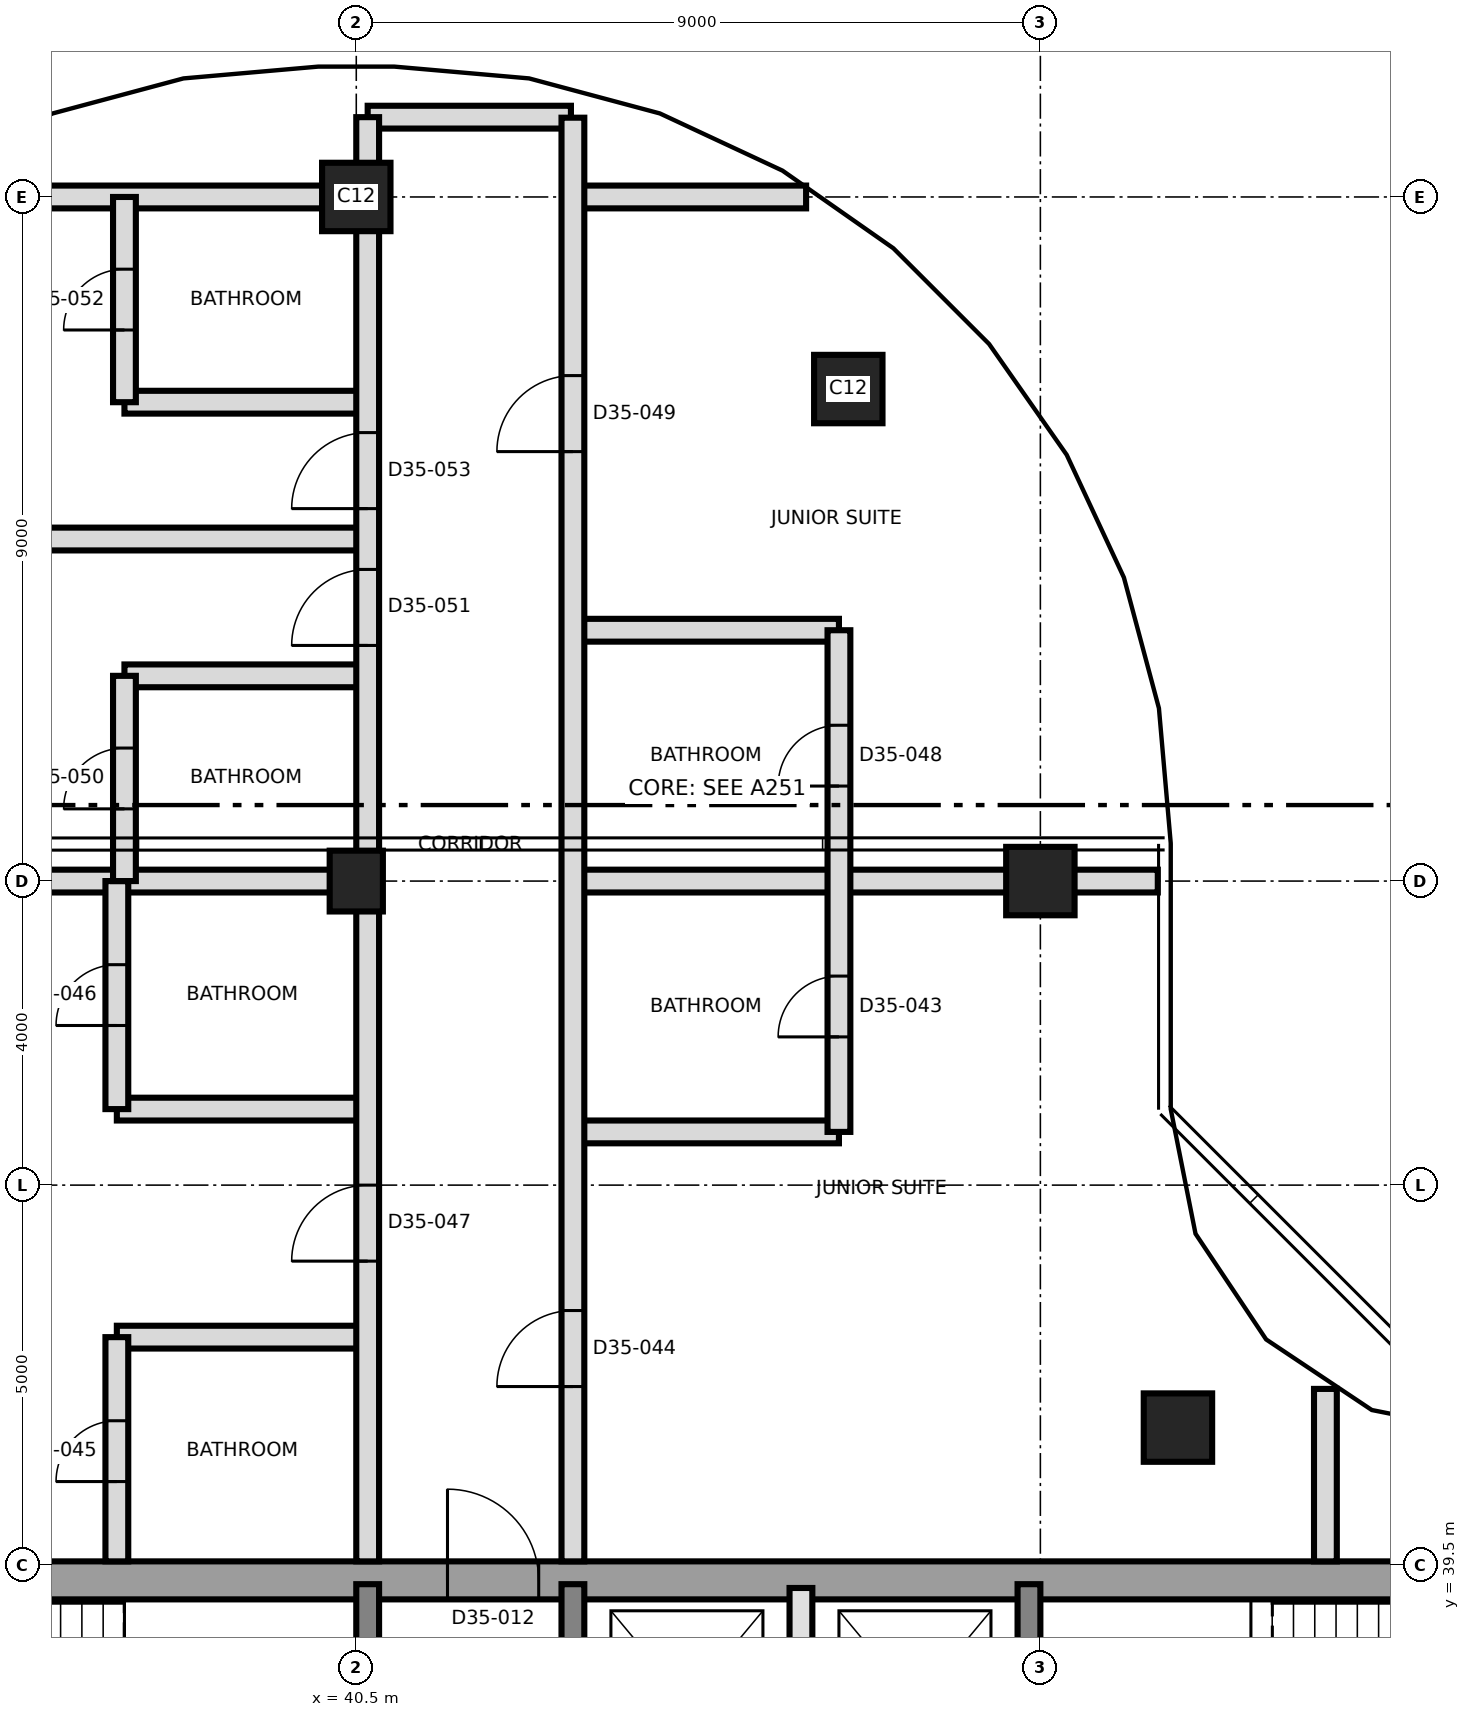
"""IFC4 building model, lengths in metres.
Left out: names, types, materials, properties, quantities, classifications, styles, units other than length and angle.
Written with IfcOpenShell. Run it as: python <this file> out.ifc"""

import sys

from ifc_helpers import new_model, si_unit, direction, frame, frame_2d, origin, origin_2d, place, context, subcontext, project, spatial, rectangle, extrude, element, fill, save


model = new_model("IFC4")
c1 = context("Model", 3, precision=1e-05, world=origin(), true_north=direction((0.0, 1.0)))
c2 = subcontext(c1, "Body", "Model", "MODEL_VIEW")
j1 = project(units=[si_unit("LENGTHUNIT", "METRE"), si_unit("PLANEANGLEUNIT", "RADIAN")], contexts=[c1])
p1 = place(None, origin())
s1 = spatial("IfcSite", under=j1, at=p1, CompositionType="ELEMENT")
p2 = place(p1, origin())
s2 = spatial("IfcBuilding", under=s1, at=p2, CompositionType="ELEMENT")
p3 = place(p2, frame((0.0, 0.0, 195.8)))
s3 = spatial("IfcBuildingStorey", under=s2, at=p3, CompositionType="ELEMENT", Elevation=195.8)
p4 = place(p3, frame((31.25, 39.3, 0.0), z_axis=(0.0, 0.0, 1.0), x_axis=(1.0, 0.0, 0.0)))
e1 = element("IfcWall", 1, at=p4, inside=s3, PredefinedType="SHEAR", context=c2, shape_type="SweptSolid", body=[
    extrude(rectangle(XDim=27.0, YDim=0.5, at=frame_2d((13.5, 0.0))), origin(), (0.0, 0.0, 1.0), 3.7),
])
p5 = place(p4, frame((10.45, 0.0, 0.0)))
e2 = element("IfcOpeningElement", 2, at=p5, cuts=e1, PredefinedType="OPENING", context=c2, shape_type="SweptSolid", body=[
    extrude(rectangle(XDim=1.2, YDim=2.1, at=frame_2d((0.6, 1.05))), frame((0.0, 0.26, 0.0), z_axis=(0.0, -1.0, 0.0), x_axis=(1.0, 0.0, 0.0)), (0.0, 0.0, 1.0), 0.52),
])
for number, where, z_axis, x_axis in (
    (3, (40.65, 33.5, 0.0), (0.0, 0.0, 1.0), (0.0, 1.0, 0.0)),
    (4, (43.35, 33.5, 0.0), (0.0, 0.0, 1.0), (0.0, 1.0, 0.0)),
    (5, (49.35, 33.5, 0.0), (0.0, 0.0, 1.0), (0.0, 1.0, 0.0)),
):
    element("IfcWall", number, at=place(p3, frame(where, z_axis=z_axis, x_axis=x_axis)), inside=s3, PredefinedType="SHEAR", context=c2, shape_type="SweptSolid", body=[
        extrude(rectangle(XDim=5.75, YDim=0.3, at=frame_2d((2.875, 0.0))), origin(), (0.0, 0.0, 1.0), 3.7),
    ])
p6 = place(p3, frame((51.31, 41.31, 0.0), z_axis=(0.0, 0.0, 1.0), x_axis=(1.0, 0.0, 0.0)))
e6 = element("IfcColumn", 6, at=p6, inside=s3, PredefinedType="COLUMN", context=c2, shape_type="SweptSolid", body=[
    extrude(rectangle(XDim=0.9, YDim=0.9, at=origin_2d()), origin(), (0.0, 0.0, 1.0), 3.7),
])
p7 = place(p3, frame((40.5, 48.5, 0.0), z_axis=(0.0, 0.0, 1.0), x_axis=(0.0, 1.0, 0.0)))
e7 = element("IfcColumn", 7, at=p7, inside=s3, PredefinedType="COLUMN", context=c2, shape_type="SweptSolid", body=[
    extrude(rectangle(XDim=0.8, YDim=0.7, at=origin_2d()), origin(), (0.0, 0.0, 1.0), 3.7),
])
for number, where, z_axis, x_axis in (
    (8, (49.5, 48.5, 0.0), (0.0, 0.0, 1.0), (1.0, 0.0, 0.0)),
    (9, (46.973, 54.973, 0.0), (0.0, 0.0, 1.0), (1.0, 0.0, 0.0)),
    (10, (40.5, 57.5, 0.0), (0.0, 0.0, 1.0), (1.0, 0.0, 0.0)),
):
    element("IfcColumn", number, at=place(p3, frame(where, z_axis=z_axis, x_axis=x_axis)), inside=s3, PredefinedType="COLUMN", context=c2, shape_type="SweptSolid", body=[
        extrude(rectangle(XDim=0.9, YDim=0.9, at=origin_2d()), origin(), (0.0, 0.0, 1.0), 3.7),
    ])
p8 = place(p3, frame((46.35, 36.2, 0.0), z_axis=(0.0, 0.0, 1.0), x_axis=(0.0, 1.0, 0.0)))
e11 = element("IfcWall", 11, at=p8, inside=s3, PredefinedType="SOLIDWALL", context=c2, shape_type="SweptSolid", body=[
    extrude(rectangle(XDim=3.0, YDim=0.3, at=frame_2d((1.5, 0.0))), origin(), (0.0, 0.0, 1.0), 3.4),
])
p9 = place(p3, frame((37.35, 42.5, 0.0), z_axis=(0.0, 0.0, 1.0), x_axis=(1.0, 0.0, 0.0)))
e12 = element("IfcWall", 12, at=p9, inside=s3, PredefinedType="PARTITIONING", context=c2, shape_type="SweptSolid", body=[
    extrude(rectangle(XDim=3.3, YDim=0.3, at=frame_2d((1.65, 0.0))), origin(), (0.0, 0.0, 1.0), 3.4),
])
p10 = place(p3, frame((43.35, 45.2, 0.0), z_axis=(0.0, 0.0, 1.0), x_axis=(1.0, 0.0, 0.0)))
e13 = element("IfcWall", 13, at=p10, inside=s3, PredefinedType="PARTITIONING", context=c2, shape_type="SweptSolid", body=[
    extrude(rectangle(XDim=3.5, YDim=0.3, at=frame_2d((1.75, 0.0))), origin(), (0.0, 0.0, 1.0), 3.4),
])
p11 = place(p3, frame((37.35, 45.5, 0.0), z_axis=(0.0, 0.0, 1.0), x_axis=(1.0, 0.0, 0.0)))
e14 = element("IfcWall", 14, at=p11, inside=s3, PredefinedType="PARTITIONING", context=c2, shape_type="SweptSolid", body=[
    extrude(rectangle(XDim=3.3, YDim=0.3, at=frame_2d((1.65, 0.0))), origin(), (0.0, 0.0, 1.0), 3.4),
])
p12 = place(p3, frame((30.135, 48.5, 0.0), z_axis=(0.0, 0.0, 1.0), x_axis=(1.0, 0.0, 0.0)))
e15 = element("IfcWall", 15, at=p12, inside=s3, PredefinedType="PARTITIONING", context=c2, shape_type="SweptSolid", body=[
    extrude(rectangle(XDim=10.515, YDim=0.3, at=frame_2d((5.257, 0.0))), origin(), (0.0, 0.0, 1.0), 3.4),
])
p13 = place(p3, frame((43.35, 48.5, 0.0), z_axis=(0.0, 0.0, 1.0), x_axis=(1.0, 0.0, 0.0)))
e16 = element("IfcWall", 16, at=p13, inside=s3, PredefinedType="PARTITIONING", context=c2, shape_type="SweptSolid", body=[
    extrude(rectangle(XDim=7.695, YDim=0.3, at=frame_2d((3.847, 0.0))), origin(), (0.0, 0.0, 1.0), 3.4),
])
p14 = place(p3, frame((37.45, 51.2, 0.0), z_axis=(0.0, 0.0, 1.0), x_axis=(1.0, 0.0, 0.0)))
e17 = element("IfcWall", 17, at=p14, inside=s3, PredefinedType="PARTITIONING", context=c2, shape_type="SweptSolid", body=[
    extrude(rectangle(XDim=3.2, YDim=0.3, at=frame_2d((1.6, 0.0))), origin(), (0.0, 0.0, 1.0), 3.4),
])
p15 = place(p3, frame((43.35, 51.8, 0.0), z_axis=(0.0, 0.0, 1.0), x_axis=(1.0, 0.0, 0.0)))
e18 = element("IfcWall", 18, at=p15, inside=s3, PredefinedType="PARTITIONING", context=c2, shape_type="SweptSolid", body=[
    extrude(rectangle(XDim=3.5, YDim=0.3, at=frame_2d((1.75, 0.0))), origin(), (0.0, 0.0, 1.0), 3.4),
])
p16 = place(p3, frame((30.757, 53.0, 0.0), z_axis=(0.0, 0.0, 1.0), x_axis=(1.0, 0.0, 0.0)))
e19 = element("IfcWall", 19, at=p16, inside=s3, PredefinedType="PARTITIONING", context=c2, shape_type="SweptSolid", body=[
    extrude(rectangle(XDim=9.893, YDim=0.3, at=frame_2d((4.946, 0.0))), origin(), (0.0, 0.0, 1.0), 3.4),
])
p17 = place(p3, frame((37.45, 54.8, 0.0), z_axis=(0.0, 0.0, 1.0), x_axis=(1.0, 0.0, 0.0)))
e20 = element("IfcWall", 20, at=p17, inside=s3, PredefinedType="PARTITIONING", context=c2, shape_type="SweptSolid", body=[
    extrude(rectangle(XDim=3.2, YDim=0.3, at=frame_2d((1.6, 0.0))), origin(), (0.0, 0.0, 1.0), 3.4),
])
p18 = place(p3, frame((34.582, 57.5, 0.0), z_axis=(0.0, 0.0, 1.0), x_axis=(1.0, 0.0, 0.0)))
e21 = element("IfcWall", 21, at=p18, inside=s3, PredefinedType="PARTITIONING", context=c2, shape_type="SweptSolid", body=[
    extrude(rectangle(XDim=6.068, YDim=0.3, at=frame_2d((3.034, 0.0))), origin(), (0.0, 0.0, 1.0), 3.4),
])
p19 = place(p3, frame((43.35, 57.5, 0.0), z_axis=(0.0, 0.0, 1.0), x_axis=(1.0, 0.0, 0.0)))
e22 = element("IfcWall", 22, at=p19, inside=s3, PredefinedType="PARTITIONING", context=c2, shape_type="SweptSolid", body=[
    extrude(rectangle(XDim=3.068, YDim=0.3, at=frame_2d((1.534, 0.0))), origin(), (0.0, 0.0, 1.0), 3.4),
])
p20 = place(p3, frame((40.65, 58.55, 0.0), z_axis=(0.0, 0.0, 1.0), x_axis=(1.0, 0.0, 0.0)))
e23 = element("IfcWall", 23, at=p20, inside=s3, PredefinedType="PARTITIONING", context=c2, shape_type="SweptSolid", body=[
    extrude(rectangle(XDim=2.674, YDim=0.3, at=frame_2d((1.337, 0.0))), origin(), (0.0, 0.0, 1.0), 3.4),
])
p21 = place(p3, frame((37.35, 39.55, 0.0), z_axis=(0.0, 0.0, 1.0), x_axis=(0.0, 1.0, 0.0)))
e24 = element("IfcWall", 24, at=p21, inside=s3, PredefinedType="PARTITIONING", context=c2, shape_type="SweptSolid", body=[
    extrude(rectangle(XDim=2.95, YDim=0.3, at=frame_2d((1.475, 0.0))), origin(), (0.0, 0.0, 1.0), 3.4),
])
p22 = place(p21, frame((1.05, 0.0, 0.0)))
e25 = element("IfcOpeningElement", 25, at=p22, cuts=e24, PredefinedType="OPENING", context=c2, shape_type="SweptSolid", body=[
    extrude(rectangle(XDim=0.8, YDim=2.1, at=frame_2d((0.4, 1.05))), frame((0.0, 0.16, 0.0), z_axis=(0.0, -1.0, 0.0), x_axis=(1.0, 0.0, 0.0)), (0.0, 0.0, 1.0), 0.32),
])
p23 = place(p3, frame((37.35, 45.5, 0.0), z_axis=(0.0, 0.0, 1.0), x_axis=(0.0, 1.0, 0.0)))
e26 = element("IfcWall", 26, at=p23, inside=s3, PredefinedType="PARTITIONING", context=c2, shape_type="SweptSolid", body=[
    extrude(rectangle(XDim=3.0, YDim=0.3, at=frame_2d((1.5, 0.0))), origin(), (0.0, 0.0, 1.0), 3.4),
])
p24 = place(p23, frame((1.1, 0.0, 0.0)))
e27 = element("IfcOpeningElement", 27, at=p24, cuts=e26, PredefinedType="OPENING", context=c2, shape_type="SweptSolid", body=[
    extrude(rectangle(XDim=0.8, YDim=2.1, at=frame_2d((0.4, 1.05))), frame((0.0, 0.16, 0.0), z_axis=(0.0, -1.0, 0.0), x_axis=(1.0, 0.0, 0.0)), (0.0, 0.0, 1.0), 0.32),
])
p25 = place(p3, frame((37.45, 48.5, 0.0), z_axis=(0.0, 0.0, 1.0), x_axis=(0.0, 1.0, 0.0)))
e28 = element("IfcWall", 28, at=p25, inside=s3, PredefinedType="PARTITIONING", context=c2, shape_type="SweptSolid", body=[
    extrude(rectangle(XDim=2.7, YDim=0.3, at=frame_2d((1.35, 0.0))), origin(), (0.0, 0.0, 1.0), 3.4),
])
p26 = place(p25, frame((0.95, 0.0, 0.0)))
e29 = element("IfcOpeningElement", 29, at=p26, cuts=e28, PredefinedType="OPENING", context=c2, shape_type="SweptSolid", body=[
    extrude(rectangle(XDim=0.8, YDim=2.1, at=frame_2d((0.4, 1.05))), frame((0.0, 0.16, 0.0), z_axis=(0.0, -1.0, 0.0), x_axis=(1.0, 0.0, 0.0)), (0.0, 0.0, 1.0), 0.32),
])
p27 = place(p3, frame((37.45, 54.8, 0.0), z_axis=(0.0, 0.0, 1.0), x_axis=(0.0, 1.0, 0.0)))
e30 = element("IfcWall", 30, at=p27, inside=s3, PredefinedType="PARTITIONING", context=c2, shape_type="SweptSolid", body=[
    extrude(rectangle(XDim=2.7, YDim=0.3, at=frame_2d((1.35, 0.0))), origin(), (0.0, 0.0, 1.0), 3.4),
])
p28 = place(p27, frame((0.95, 0.0, 0.0)))
e31 = element("IfcOpeningElement", 31, at=p28, cuts=e30, PredefinedType="OPENING", context=c2, shape_type="SweptSolid", body=[
    extrude(rectangle(XDim=0.8, YDim=2.1, at=frame_2d((0.4, 1.05))), frame((0.0, 0.16, 0.0), z_axis=(0.0, -1.0, 0.0), x_axis=(1.0, 0.0, 0.0)), (0.0, 0.0, 1.0), 0.32),
])
p29 = place(p3, frame((40.65, 39.55, 0.0), z_axis=(0.0, 0.0, 1.0), x_axis=(0.0, 1.0, 0.0)))
e32 = element("IfcWall", 32, at=p29, inside=s3, PredefinedType="PARTITIONING", context=c2, shape_type="SweptSolid", body=[
    extrude(rectangle(XDim=19.0, YDim=0.3, at=frame_2d((9.5, 0.0))), origin(), (0.0, 0.0, 1.0), 3.4),
])
p30 = place(p29, frame((3.95, 0.0, 0.0)))
e33 = element("IfcOpeningElement", 33, at=p30, cuts=e32, PredefinedType="OPENING", context=c2, shape_type="SweptSolid", body=[
    extrude(rectangle(XDim=1.0, YDim=2.4, at=frame_2d((0.5, 1.2))), frame((0.0, 0.16, 0.0), z_axis=(0.0, -1.0, 0.0), x_axis=(1.0, 0.0, 0.0)), (0.0, 0.0, 1.0), 0.32),
])
p31 = place(p29, frame((12.05, 0.0, 0.0)))
e34 = element("IfcOpeningElement", 34, at=p31, cuts=e32, PredefinedType="OPENING", context=c2, shape_type="SweptSolid", body=[
    extrude(rectangle(XDim=1.0, YDim=2.1, at=frame_2d((0.5, 1.05))), frame((0.0, 0.16, 0.0), z_axis=(0.0, -1.0, 0.0), x_axis=(1.0, 0.0, 0.0)), (0.0, 0.0, 1.0), 0.32),
])
p32 = place(p29, frame((13.85, 0.0, 0.0)))
e35 = element("IfcOpeningElement", 35, at=p32, cuts=e32, PredefinedType="OPENING", context=c2, shape_type="SweptSolid", body=[
    extrude(rectangle(XDim=1.0, YDim=2.1, at=frame_2d((0.5, 1.05))), frame((0.0, 0.16, 0.0), z_axis=(0.0, -1.0, 0.0), x_axis=(1.0, 0.0, 0.0)), (0.0, 0.0, 1.0), 0.32),
])
p33 = place(p3, frame((43.35, 39.55, 0.0), z_axis=(0.0, 0.0, 1.0), x_axis=(0.0, 1.0, 0.0)))
e36 = element("IfcWall", 36, at=p33, inside=s3, PredefinedType="PARTITIONING", context=c2, shape_type="SweptSolid", body=[
    extrude(rectangle(XDim=18.993, YDim=0.3, at=frame_2d((9.497, 0.0))), origin(), (0.0, 0.0, 1.0), 3.4),
])
p34 = place(p33, frame((2.3, 0.0, 0.0)))
e37 = element("IfcOpeningElement", 37, at=p34, cuts=e36, PredefinedType="OPENING", context=c2, shape_type="SweptSolid", body=[
    extrude(rectangle(XDim=1.0, YDim=2.4, at=frame_2d((0.5, 1.2))), frame((0.0, 0.16, 0.0), z_axis=(0.0, -1.0, 0.0), x_axis=(1.0, 0.0, 0.0)), (0.0, 0.0, 1.0), 0.32),
])
p35 = place(p33, frame((14.6, 0.0, 0.0)))
e38 = element("IfcOpeningElement", 38, at=p35, cuts=e36, PredefinedType="OPENING", context=c2, shape_type="SweptSolid", body=[
    extrude(rectangle(XDim=1.0, YDim=2.4, at=frame_2d((0.5, 1.2))), frame((0.0, 0.16, 0.0), z_axis=(0.0, -1.0, 0.0), x_axis=(1.0, 0.0, 0.0)), (0.0, 0.0, 1.0), 0.32),
])
p36 = place(p3, frame((46.85, 45.2, 0.0), z_axis=(0.0, 0.0, 1.0), x_axis=(0.0, 1.0, 0.0)))
e39 = element("IfcWall", 39, at=p36, inside=s3, PredefinedType="PARTITIONING", context=c2, shape_type="SweptSolid", body=[
    extrude(rectangle(XDim=6.6, YDim=0.3, at=frame_2d((3.3, 0.0))), origin(), (0.0, 0.0, 1.0), 3.4),
])
p37 = place(p36, frame((1.25, 0.0, 0.0)))
e40 = element("IfcOpeningElement", 40, at=p37, cuts=e39, PredefinedType="OPENING", context=c2, shape_type="SweptSolid", body=[
    extrude(rectangle(XDim=0.8, YDim=2.1, at=frame_2d((0.4, 1.05))), frame((0.0, 0.16, 0.0), z_axis=(0.0, -1.0, 0.0), x_axis=(1.0, 0.0, 0.0)), (0.0, 0.0, 1.0), 0.32),
])
p38 = place(p36, frame((4.55, 0.0, 0.0)))
e41 = element("IfcOpeningElement", 41, at=p38, cuts=e39, PredefinedType="OPENING", context=c2, shape_type="SweptSolid", body=[
    extrude(rectangle(XDim=0.8, YDim=2.1, at=frame_2d((0.4, 1.05))), frame((0.0, 0.16, 0.0), z_axis=(0.0, -1.0, 0.0), x_axis=(1.0, 0.0, 0.0)), (0.0, 0.0, 1.0), 0.32),
])
p39 = place(p3, frame((53.25, 39.55, 0.0), z_axis=(0.0, 0.0, 1.0), x_axis=(0.0, 1.0, 0.0)))
e42 = element("IfcWall", 42, at=p39, inside=s3, PredefinedType="PARTITIONING", context=c2, shape_type="SweptSolid", body=[
    extrude(rectangle(XDim=2.269, YDim=0.3, at=frame_2d((1.135, 0.0))), origin(), (0.0, 0.0, 1.0), 3.4),
])
p40 = place(p5, origin())
e43 = element("IfcDoor", 43, at=p40, inside=s3, OperationType="SINGLE_SWING_RIGHT", PredefinedType="DOOR", context=c2, shape_type="SweptSolid", body=[
    extrude(rectangle(XDim=1.2, YDim=2.1, at=frame_2d((0.6, 1.05))), frame((0.0, 0.025, 0.0), z_axis=(0.0, -1.0, 0.0), x_axis=(1.0, 0.0, 0.0)), (0.0, 0.0, 1.0), 0.05),
])
fill(e2, e43)
p41 = place(p37, origin())
e44 = element("IfcDoor", 44, at=p41, inside=s3, OperationType="SINGLE_SWING_RIGHT", PredefinedType="DOOR", context=c2, shape_type="SweptSolid", body=[
    extrude(rectangle(XDim=0.8, YDim=2.1, at=frame_2d((0.4, 1.05))), frame((0.0, 0.025, 0.0), z_axis=(0.0, -1.0, 0.0), x_axis=(1.0, 0.0, 0.0)), (0.0, 0.0, 1.0), 0.05),
])
fill(e40, e44)
p42 = place(p34, origin())
e45 = element("IfcDoor", 45, at=p42, inside=s3, OperationType="SINGLE_SWING_LEFT", PredefinedType="DOOR", context=c2, shape_type="SweptSolid", body=[
    extrude(rectangle(XDim=1.0, YDim=2.4, at=frame_2d((0.5, 1.2))), frame((0.0, 0.025, 0.0), z_axis=(0.0, -1.0, 0.0), x_axis=(1.0, 0.0, 0.0)), (0.0, 0.0, 1.0), 0.05),
])
fill(e37, e45)
p43 = place(p22, origin())
e46 = element("IfcDoor", 46, at=p43, inside=s3, OperationType="SINGLE_SWING_LEFT", PredefinedType="DOOR", context=c2, shape_type="SweptSolid", body=[
    extrude(rectangle(XDim=0.8, YDim=2.1, at=frame_2d((0.4, 1.05))), frame((0.0, 0.025, 0.0), z_axis=(0.0, -1.0, 0.0), x_axis=(1.0, 0.0, 0.0)), (0.0, 0.0, 1.0), 0.05),
])
fill(e25, e46)
p44 = place(p24, origin())
e47 = element("IfcDoor", 47, at=p44, inside=s3, OperationType="SINGLE_SWING_RIGHT", PredefinedType="DOOR", context=c2, shape_type="SweptSolid", body=[
    extrude(rectangle(XDim=0.8, YDim=2.1, at=frame_2d((0.4, 1.05))), frame((0.0, 0.025, 0.0), z_axis=(0.0, -1.0, 0.0), x_axis=(1.0, 0.0, 0.0)), (0.0, 0.0, 1.0), 0.05),
])
fill(e27, e47)
p45 = place(p30, origin())
e48 = element("IfcDoor", 48, at=p45, inside=s3, OperationType="SINGLE_SWING_LEFT", PredefinedType="DOOR", context=c2, shape_type="SweptSolid", body=[
    extrude(rectangle(XDim=1.0, YDim=2.4, at=frame_2d((0.5, 1.2))), frame((0.0, 0.025, 0.0), z_axis=(0.0, -1.0, 0.0), x_axis=(1.0, 0.0, 0.0)), (0.0, 0.0, 1.0), 0.05),
])
fill(e33, e48)
p46 = place(p38, origin())
e49 = element("IfcDoor", 49, at=p46, inside=s3, OperationType="SINGLE_SWING_LEFT", PredefinedType="DOOR", context=c2, shape_type="SweptSolid", body=[
    extrude(rectangle(XDim=0.8, YDim=2.1, at=frame_2d((0.4, 1.05))), frame((0.0, 0.025, 0.0), z_axis=(0.0, -1.0, 0.0), x_axis=(1.0, 0.0, 0.0)), (0.0, 0.0, 1.0), 0.05),
])
fill(e41, e49)
p47 = place(p35, origin())
e50 = element("IfcDoor", 50, at=p47, inside=s3, OperationType="SINGLE_SWING_LEFT", PredefinedType="DOOR", context=c2, shape_type="SweptSolid", body=[
    extrude(rectangle(XDim=1.0, YDim=2.4, at=frame_2d((0.5, 1.2))), frame((0.0, 0.025, 0.0), z_axis=(0.0, -1.0, 0.0), x_axis=(1.0, 0.0, 0.0)), (0.0, 0.0, 1.0), 0.05),
])
fill(e38, e50)
p48 = place(p26, origin())
e51 = element("IfcDoor", 51, at=p48, inside=s3, OperationType="SINGLE_SWING_LEFT", PredefinedType="DOOR", context=c2, shape_type="SweptSolid", body=[
    extrude(rectangle(XDim=0.8, YDim=2.1, at=frame_2d((0.4, 1.05))), frame((0.0, 0.025, 0.0), z_axis=(0.0, -1.0, 0.0), x_axis=(1.0, 0.0, 0.0)), (0.0, 0.0, 1.0), 0.05),
])
fill(e29, e51)
p49 = place(p31, origin())
e52 = element("IfcDoor", 52, at=p49, inside=s3, OperationType="SINGLE_SWING_RIGHT", PredefinedType="DOOR", context=c2, shape_type="SweptSolid", body=[
    extrude(rectangle(XDim=1.0, YDim=2.1, at=frame_2d((0.5, 1.05))), frame((0.0, 0.025, 0.0), z_axis=(0.0, -1.0, 0.0), x_axis=(1.0, 0.0, 0.0)), (0.0, 0.0, 1.0), 0.05),
])
fill(e34, e52)
p50 = place(p28, origin())
e53 = element("IfcDoor", 53, at=p50, inside=s3, OperationType="SINGLE_SWING_RIGHT", PredefinedType="DOOR", context=c2, shape_type="SweptSolid", body=[
    extrude(rectangle(XDim=0.8, YDim=2.1, at=frame_2d((0.4, 1.05))), frame((0.0, 0.025, 0.0), z_axis=(0.0, -1.0, 0.0), x_axis=(1.0, 0.0, 0.0)), (0.0, 0.0, 1.0), 0.05),
])
fill(e31, e53)
p51 = place(p32, origin())
e54 = element("IfcDoor", 54, at=p51, inside=s3, OperationType="SINGLE_SWING_LEFT", PredefinedType="DOOR", context=c2, shape_type="SweptSolid", body=[
    extrude(rectangle(XDim=1.0, YDim=2.1, at=frame_2d((0.5, 1.05))), frame((0.0, 0.025, 0.0), z_axis=(0.0, -1.0, 0.0), x_axis=(1.0, 0.0, 0.0)), (0.0, 0.0, 1.0), 0.05),
])
fill(e35, e54)
save(model, sys.argv[1])
